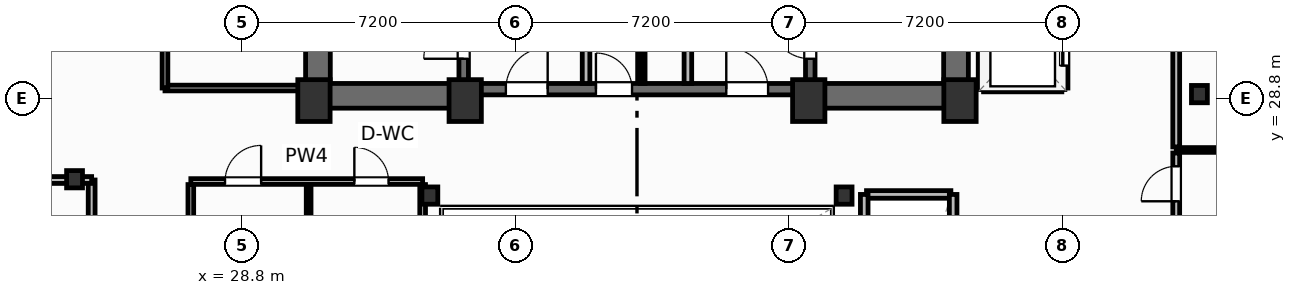
"""IFC4 building model, lengths in metres.
Left out: names, types, materials, properties, quantities, classifications, styles, units other than length and angle.
Written with IfcOpenShell. Run it as: python <this file> out.ifc"""

import sys

from ifc_helpers import new_model, si_unit, direction, frame, frame_2d, origin, origin_2d, place, context, subcontext, project, spatial, rectangle, i_section, extrude, element, fill, save


model = new_model("IFC4")
c1 = context("Model", 3, precision=1e-05, world=origin(), true_north=direction((0.0, 1.0)))
c2 = subcontext(c1, "Body", "Model", "MODEL_VIEW")
j1 = project(units=[si_unit("LENGTHUNIT", "METRE"), si_unit("PLANEANGLEUNIT", "RADIAN")], contexts=[c1])
p1 = place(None, origin())
s1 = spatial("IfcSite", under=j1, at=p1, CompositionType="ELEMENT")
p2 = place(p1, origin())
s2 = spatial("IfcBuilding", under=s1, at=p2, CompositionType="ELEMENT")
p3 = place(p2, frame((0.0, 0.0, 196.8)))
s3 = spatial("IfcBuildingStorey", under=s2, at=p3, CompositionType="ELEMENT", Elevation=196.8)
for number, where, z_axis, x_axis in (
    (1, (30.7, 28.75, 0.0), (0.0, 0.0, 1.0), (1.0, 0.0, 0.0)),
    (2, (34.68, 28.75, 0.0), (0.0, 0.0, 1.0), (1.0, 0.0, 0.0)),
    (3, (43.72, 28.75, 0.0), (0.0, 0.0, 1.0), (1.0, 0.0, 0.0)),
    (4, (47.7, 28.75, 0.0), (0.0, 0.0, 1.0), (1.0, 0.0, 0.0)),
):
    element("IfcColumn", number, at=place(p3, frame(where, z_axis=z_axis, x_axis=x_axis)), inside=s3, PredefinedType="COLUMN", context=c2, shape_type="SweptSolid", body=[
        extrude(rectangle(XDim=0.85, YDim=1.1, at=origin_2d()), origin(), (0.0, 0.0, 1.0), 3.7),
    ])
for number, where, z_axis, x_axis in (
    (5, (33.75, 26.25, 0.0), (0.0, 0.0, 1.0), (1.0, 0.0, 0.0)),
    (6, (44.65, 26.25, 0.0), (0.0, 0.0, 1.0), (1.0, 0.0, 0.0)),
    (7, (24.4, 26.68, 0.0), (0.0, 0.0, 1.0), (1.0, 0.0, 0.0)),
    (8, (54.0, 28.92, 0.0), (0.0, 0.0, 1.0), (1.0, 0.0, 0.0)),
):
    element("IfcColumn", number, at=place(p3, frame(where, z_axis=z_axis, x_axis=x_axis)), inside=s3, PredefinedType="COLUMN", context=c2, shape_type="SweptSolid", body=[
        extrude(i_section(OverallWidth=0.418, OverallDepth=0.455, WebThickness=0.042, FlangeThickness=0.068, FilletRadius=0.025, at=origin_2d()), origin(), (0.0, 0.0, 1.0), 3.7),
    ])
for number, where, z_axis, x_axis in (
    (9, (30.805, 29.2, 0.0), (0.0, 0.0, 1.0), (0.0, 1.0, 0.0)),
    (10, (47.595, 29.2, 0.0), (0.0, 0.0, 1.0), (0.0, 1.0, 0.0)),
):
    element("IfcWall", number, at=place(p3, frame(where, z_axis=z_axis, x_axis=x_axis)), inside=s3, PredefinedType="SHEAR", context=c2, shape_type="SweptSolid", body=[
        extrude(rectangle(XDim=9.22, YDim=0.65, at=frame_2d((4.61, 0.0))), origin(), (0.0, 0.0, 1.0), 3.45),
    ])
p4 = place(p3, frame((30.48, 28.875, 0.0), z_axis=(0.0, 0.0, 1.0), x_axis=(1.0, 0.0, 0.0)))
e11 = element("IfcWall", 11, at=p4, inside=s3, PredefinedType="SHEAR", context=c2, shape_type="SweptSolid", body=[
    extrude(rectangle(XDim=4.32, YDim=0.65, at=frame_2d((2.16, 0.0))), origin(), (0.0, 0.0, 1.0), 3.45),
])
p5 = place(p3, frame((43.6, 28.875, 0.0), z_axis=(0.0, 0.0, 1.0), x_axis=(1.0, 0.0, 0.0)))
e12 = element("IfcWall", 12, at=p5, inside=s3, PredefinedType="SHEAR", context=c2, shape_type="SweptSolid", body=[
    extrude(rectangle(XDim=4.32, YDim=0.65, at=frame_2d((2.16, 0.0))), origin(), (0.0, 0.0, 1.0), 3.45),
])
p6 = place(p3, frame((34.8, 29.05, 0.0), z_axis=(0.0, 0.0, 1.0), x_axis=(1.0, 0.0, 0.0)))
e13 = element("IfcWall", 13, at=p6, inside=s3, PredefinedType="SHEAR", context=c2, shape_type="SweptSolid", body=[
    extrude(rectangle(XDim=8.8, YDim=0.3, at=frame_2d((4.4, 0.0))), origin(), (0.0, 0.0, 1.0), 3.45),
])
p7 = place(p6, frame((0.95, 0.0, 0.0)))
e14 = element("IfcOpeningElement", 14, at=p7, cuts=e13, PredefinedType="OPENING", context=c2, shape_type="SweptSolid", body=[
    extrude(rectangle(XDim=1.1, YDim=2.15, at=frame_2d((0.55, 1.075))), frame((0.0, 0.16, 0.0), z_axis=(0.0, -1.0, 0.0), x_axis=(1.0, 0.0, 0.0)), (0.0, 0.0, 1.0), 0.32),
])
p8 = place(p6, frame((6.75, 0.0, 0.0)))
e15 = element("IfcOpeningElement", 15, at=p8, cuts=e13, PredefinedType="OPENING", context=c2, shape_type="SweptSolid", body=[
    extrude(rectangle(XDim=1.1, YDim=2.15, at=frame_2d((0.55, 1.075))), frame((0.0, 0.16, 0.0), z_axis=(0.0, -1.0, 0.0), x_axis=(1.0, 0.0, 0.0)), (0.0, 0.0, 1.0), 0.32),
])
p9 = place(p6, frame((3.32, 0.0, 0.0)))
e16 = element("IfcOpeningElement", 16, at=p9, cuts=e13, PredefinedType="OPENING", context=c2, shape_type="SweptSolid", body=[
    extrude(rectangle(XDim=0.95, YDim=2.15, at=frame_2d((0.475, 1.075))), frame((0.0, 0.16, 0.0), z_axis=(0.0, -1.0, 0.0), x_axis=(1.0, 0.0, 0.0)), (0.0, 0.0, 1.0), 0.32),
])
p10 = place(p3, frame((34.64, 29.2, 0.0), z_axis=(0.0, 0.0, 1.0), x_axis=(0.0, 1.0, 0.0)))
e17 = element("IfcWall", 17, at=p10, inside=s3, PredefinedType="SHEAR", context=c2, shape_type="SweptSolid", body=[
    extrude(rectangle(XDim=9.22, YDim=0.25, at=frame_2d((4.61, 0.0))), origin(), (0.0, 0.0, 1.0), 3.45),
])
p11 = place(p10, frame((0.65, 0.0, 0.0)))
e18 = element("IfcOpeningElement", 18, at=p11, cuts=e17, PredefinedType="OPENING", context=c2, shape_type="SweptSolid", body=[
    extrude(rectangle(XDim=1.05, YDim=2.15, at=frame_2d((0.525, 1.075))), frame((0.0, 0.135, 0.0), z_axis=(0.0, -1.0, 0.0), x_axis=(1.0, 0.0, 0.0)), (0.0, 0.0, 1.0), 0.27),
])
p12 = place(p3, frame((43.76, 29.2, 0.0), z_axis=(0.0, 0.0, 1.0), x_axis=(0.0, 1.0, 0.0)))
e19 = element("IfcWall", 19, at=p12, inside=s3, PredefinedType="SHEAR", context=c2, shape_type="SweptSolid", body=[
    extrude(rectangle(XDim=9.22, YDim=0.25, at=frame_2d((4.61, 0.0))), origin(), (0.0, 0.0, 1.0), 3.45),
])
p13 = place(p12, frame((0.65, 0.0, 0.0)))
e20 = element("IfcOpeningElement", 20, at=p13, cuts=e19, PredefinedType="OPENING", context=c2, shape_type="SweptSolid", body=[
    extrude(rectangle(XDim=1.05, YDim=2.15, at=frame_2d((0.525, 1.075))), frame((0.0, 0.135, 0.0), z_axis=(0.0, -1.0, 0.0), x_axis=(1.0, 0.0, 0.0)), (0.0, 0.0, 1.0), 0.27),
])
p14 = place(p3, frame((24.85, 19.24, 0.0), z_axis=(0.0, 0.0, 1.0), x_axis=(0.0, 1.0, 0.0)))
e21 = element("IfcWall", 21, at=p14, inside=s3, PredefinedType="PARTITIONING", context=c2, shape_type="SweptSolid", body=[
    extrude(rectangle(XDim=7.42, YDim=0.18, at=frame_2d((3.71, 0.0))), origin(), (0.0, 0.0, 1.0), 3.45),
])
p15 = place(p14, frame((2.4, 0.0, 0.0)))
e22 = element("IfcOpeningElement", 22, at=p15, cuts=e21, PredefinedType="OPENING", context=c2, shape_type="SweptSolid", body=[
    extrude(rectangle(XDim=0.92, YDim=2.05, at=frame_2d((0.46, 1.025))), frame((0.0, 0.1, 0.0), z_axis=(0.0, -1.0, 0.0), x_axis=(1.0, 0.0, 0.0)), (0.0, 0.0, 1.0), 0.2),
])
p16 = place(p3, frame((3.658, 26.66, 0.0), z_axis=(0.0, 0.0, 1.0), x_axis=(1.0, 0.0, 0.0)))
e23 = element("IfcWall", 23, at=p16, inside=s3, PredefinedType="PARTITIONING", context=c2, shape_type="SweptSolid", body=[
    extrude(rectangle(XDim=21.192, YDim=0.18, at=frame_2d((10.596, 0.0))), origin(), (0.0, 0.0, 1.0), 2.662),
])
p17 = place(p3, frame((53.39, 19.3, 0.0), z_axis=(0.0, 0.0, 1.0), x_axis=(0.0, 1.0, 0.0)))
e24 = element("IfcWall", 24, at=p17, inside=s3, PredefinedType="PARTITIONING", context=c2, shape_type="SweptSolid", body=[
    extrude(rectangle(XDim=8.07, YDim=0.18, at=frame_2d((4.035, 0.0))), origin(), (0.0, 0.0, 1.0), 3.45),
])
p18 = place(p17, frame((6.8, 0.0, 0.0)))
e25 = element("IfcOpeningElement", 25, at=p18, cuts=e24, PredefinedType="OPENING", context=c2, shape_type="SweptSolid", body=[
    extrude(rectangle(XDim=0.92, YDim=2.05, at=frame_2d((0.46, 1.025))), frame((0.0, 0.1, 0.0), z_axis=(0.0, -1.0, 0.0), x_axis=(1.0, 0.0, 0.0)), (0.0, 0.0, 1.0), 0.2),
])
p19 = place(p3, frame((53.39, 27.53, 0.0), z_axis=(0.0, 0.0, 1.0), x_axis=(0.0, 1.0, 0.0)))
e26 = element("IfcWall", 26, at=p19, inside=s3, PredefinedType="PARTITIONING", context=c2, shape_type="SweptSolid", body=[
    extrude(rectangle(XDim=11.67, YDim=0.18, at=frame_2d((5.835, 0.0))), origin(), (0.0, 0.0, 1.0), 3.45),
])
p20 = place(p19, frame((5.8, 0.0, 0.0)))
e27 = element("IfcOpeningElement", 27, at=p20, cuts=e26, PredefinedType="OPENING", context=c2, shape_type="SweptSolid", body=[
    extrude(rectangle(XDim=0.92, YDim=2.05, at=frame_2d((0.46, 1.025))), frame((0.0, 0.1, 0.0), z_axis=(0.0, -1.0, 0.0), x_axis=(1.0, 0.0, 0.0)), (0.0, 0.0, 1.0), 0.2),
])
p21 = place(p3, frame((53.39, 27.45, 0.0), z_axis=(0.0, 0.0, 1.0), x_axis=(1.0, 0.0, 0.0)))
e28 = element("IfcWall", 28, at=p21, inside=s3, PredefinedType="PARTITIONING", context=c2, shape_type="SweptSolid", body=[
    extrude(rectangle(XDim=20.927, YDim=0.125, at=frame_2d((10.463, 0.0))), origin(), (0.0, 0.0, 1.0), 2.662),
])
for number, where, z_axis, x_axis in (
    (29, (37.86, 29.2, 0.0), (0.0, 0.0, 1.0), (0.0, 1.0, 0.0)),
    (30, (40.54, 29.2, 0.0), (0.0, 0.0, 1.0), (0.0, 1.0, 0.0)),
):
    element("IfcWall", number, at=place(p3, frame(where, z_axis=z_axis, x_axis=x_axis)), inside=s3, PredefinedType="PARTITIONING", context=c2, shape_type="SweptSolid", body=[
        extrude(rectangle(XDim=5.18, YDim=0.2, at=frame_2d((2.59, 0.0))), origin(), (0.0, 0.0, 1.0), 3.45),
    ])
p22 = place(p3, frame((39.35, 29.2, 0.0), z_axis=(0.0, 0.0, 1.0), x_axis=(0.0, 1.0, 0.0)))
e31 = element("IfcWall", 31, at=p22, inside=s3, PredefinedType="PARTITIONING", context=c2, shape_type="SweptSolid", body=[
    extrude(rectangle(XDim=5.22, YDim=0.125, at=frame_2d((2.61, 0.0))), origin(), (0.0, 0.0, 1.0), 3.45),
])
p23 = place(p22, frame((2.05, 0.0, 0.0)))
e32 = element("IfcOpeningElement", 32, at=p23, cuts=e31, PredefinedType="OPENING", context=c2, shape_type="SweptSolid", body=[
    extrude(rectangle(XDim=0.85, YDim=2.05, at=frame_2d((0.425, 1.025))), frame((0.0, 0.073, 0.0), z_axis=(0.0, -1.0, 0.0), x_axis=(1.0, 0.0, 0.0)), (0.0, 0.0, 1.0), 0.145),
])
p24 = place(p3, frame((27.46, 26.62, 0.0), z_axis=(0.0, 0.0, 1.0), x_axis=(1.0, 0.0, 0.0)))
e33 = element("IfcWall", 33, at=p24, inside=s3, PredefinedType="PARTITIONING", context=c2, shape_type="SweptSolid", body=[
    extrude(rectangle(XDim=6.1, YDim=0.15, at=frame_2d((3.05, 0.0))), origin(), (0.0, 0.0, 1.0), 2.662),
])
p25 = place(p24, frame((0.9, 0.0, 0.0)))
e34 = element("IfcOpeningElement", 34, at=p25, cuts=e33, PredefinedType="OPENING", context=c2, shape_type="SweptSolid", body=[
    extrude(rectangle(XDim=0.95, YDim=2.05, at=frame_2d((0.475, 1.025))), frame((0.0, 0.085, 0.0), z_axis=(0.0, -1.0, 0.0), x_axis=(1.0, 0.0, 0.0)), (0.0, 0.0, 1.0), 0.17),
])
p26 = place(p24, frame((4.303, 0.0, 0.0)))
e35 = element("IfcOpeningElement", 35, at=p26, cuts=e33, PredefinedType="OPENING", context=c2, shape_type="SweptSolid", body=[
    extrude(rectangle(XDim=0.9, YDim=2.05, at=frame_2d((0.45, 1.025))), frame((0.0, 0.085, 0.0), z_axis=(0.0, -1.0, 0.0), x_axis=(1.0, 0.0, 0.0)), (0.0, 0.0, 1.0), 0.17),
])
p27 = place(p3, frame((30.56, 19.38, 0.0), z_axis=(0.0, 0.0, 1.0), x_axis=(0.0, 1.0, 0.0)))
e36 = element("IfcWall", 36, at=p27, inside=s3, PredefinedType="PARTITIONING", context=c2, shape_type="SweptSolid", body=[
    extrude(rectangle(XDim=7.16, YDim=0.125, at=frame_2d((3.58, 0.0))), origin(), (0.0, 0.0, 1.0), 3.45),
])
p28 = place(p27, frame((1.4, 0.0, 0.0)))
e37 = element("IfcOpeningElement", 37, at=p28, cuts=e36, PredefinedType="OPENING", context=c2, shape_type="SweptSolid", body=[
    extrude(rectangle(XDim=0.92, YDim=2.05, at=frame_2d((0.46, 1.025))), frame((0.0, 0.073, 0.0), z_axis=(0.0, -1.0, 0.0), x_axis=(1.0, 0.0, 0.0)), (0.0, 0.0, 1.0), 0.145),
])
p29 = place(p3, frame((27.46, 19.38, 0.0), z_axis=(0.0, 0.0, 1.0), x_axis=(0.0, 1.0, 0.0)))
e38 = element("IfcWall", 38, at=p29, inside=s3, PredefinedType="PARTITIONING", context=c2, shape_type="SweptSolid", body=[
    extrude(rectangle(XDim=7.16, YDim=0.15, at=frame_2d((3.58, 0.0))), origin(), (0.0, 0.0, 1.0), 3.45),
])
p30 = place(p3, frame((33.56, 19.38, 0.0), z_axis=(0.0, 0.0, 1.0), x_axis=(0.0, 1.0, 0.0)))
e39 = element("IfcWall", 39, at=p30, inside=s3, PredefinedType="PARTITIONING", context=c2, shape_type="SweptSolid", body=[
    extrude(rectangle(XDim=7.16, YDim=0.15, at=frame_2d((3.58, 0.0))), origin(), (0.0, 0.0, 1.0), 2.824),
])
p31 = place(p3, frame((26.78, 29.08, 0.0), z_axis=(0.0, 0.0, 1.0), x_axis=(1.0, 0.0, 0.0)))
e40 = element("IfcWall", 40, at=p31, inside=s3, PredefinedType="PARTITIONING", context=c2, shape_type="SweptSolid", body=[
    extrude(rectangle(XDim=3.7, YDim=0.15, at=frame_2d((1.85, 0.0))), origin(), (0.0, 0.0, 1.0), 3.45),
])
p32 = place(p3, frame((26.78, 29.08, 0.0), z_axis=(0.0, 0.0, 1.0), x_axis=(0.0, 1.0, 0.0)))
e41 = element("IfcWall", 41, at=p32, inside=s3, PredefinedType="PARTITIONING", context=c2, shape_type="SweptSolid", body=[
    extrude(rectangle(XDim=9.18, YDim=0.15, at=frame_2d((4.59, 0.0))), origin(), (0.0, 0.0, 1.0), 3.45),
])
p33 = place(p32, frame((2.4, 0.0, 0.0)))
e42 = element("IfcOpeningElement", 42, at=p33, cuts=e41, PredefinedType="OPENING", context=c2, shape_type="SweptSolid", body=[
    extrude(rectangle(XDim=0.95, YDim=2.05, at=frame_2d((0.475, 1.025))), frame((0.0, 0.085, 0.0), z_axis=(0.0, -1.0, 0.0), x_axis=(1.0, 0.0, 0.0)), (0.0, 0.0, 1.0), 0.17),
])
p34 = place(p3, frame((48.32, 29.08, 0.0), z_axis=(0.0, 0.0, 1.0), x_axis=(1.0, 0.0, 0.0)))
e43 = element("IfcWall", 43, at=p34, inside=s3, PredefinedType="PARTITIONING", context=c2, shape_type="SweptSolid", body=[
    extrude(rectangle(XDim=2.06, YDim=0.2, at=frame_2d((1.03, 0.0))), origin(), (0.0, 0.0, 1.0), 2.662),
])
p35 = place(p3, frame((48.28, 29.08, 0.0), z_axis=(0.0, 0.0, 1.0), x_axis=(0.0, 1.0, 0.0)))
e44 = element("IfcWall", 44, at=p35, inside=s3, PredefinedType="PARTITIONING", context=c2, shape_type="SweptSolid", body=[
    extrude(rectangle(XDim=6.89, YDim=0.2, at=frame_2d((3.445, 0.0))), origin(), (0.0, 0.0, 1.0), 3.45),
])
p36 = place(p3, frame((50.44, 29.08, 0.0), z_axis=(0.0, 0.0, 1.0), x_axis=(0.0, 1.0, 0.0)))
e45 = element("IfcWall", 45, at=p36, inside=s3, PredefinedType="PARTITIONING", context=c2, shape_type="SweptSolid", body=[
    extrude(rectangle(XDim=6.89, YDim=0.2, at=frame_2d((3.445, 0.0))), origin(), (0.0, 0.0, 1.0), 3.45),
])
p37 = place(p36, frame((0.59, 0.0, 0.0)))
e46 = element("IfcOpeningElement", 46, at=p37, cuts=e45, PredefinedType="OPENING", context=c2, shape_type="SweptSolid", body=[
    extrude(rectangle(XDim=1.1, YDim=2.15, at=frame_2d((0.55, 1.075))), frame((0.0, 0.11, 0.0), z_axis=(0.0, -1.0, 0.0), x_axis=(1.0, 0.0, 0.0)), (0.0, 0.0, 1.0), 0.22),
])
p38 = place(p36, frame((2.89, 0.0, 0.0)))
e47 = element("IfcOpeningElement", 47, at=p38, cuts=e45, PredefinedType="OPENING", context=c2, shape_type="SweptSolid", body=[
    extrude(rectangle(XDim=1.1, YDim=2.15, at=frame_2d((0.55, 1.075))), frame((0.0, 0.11, 0.0), z_axis=(0.0, -1.0, 0.0), x_axis=(1.0, 0.0, 0.0)), (0.0, 0.0, 1.0), 0.22),
])
p39 = place(p36, frame((5.19, 0.0, 0.0)))
e48 = element("IfcOpeningElement", 48, at=p39, cuts=e45, PredefinedType="OPENING", context=c2, shape_type="SweptSolid", body=[
    extrude(rectangle(XDim=1.1, YDim=2.15, at=frame_2d((0.55, 1.075))), frame((0.0, 0.11, 0.0), z_axis=(0.0, -1.0, 0.0), x_axis=(1.0, 0.0, 0.0)), (0.0, 0.0, 1.0), 0.22),
])
p40 = place(p3, frame((45.24, 26.28, 0.0), z_axis=(0.0, 0.0, 1.0), x_axis=(1.0, 0.0, 0.0)))
e49 = element("IfcWall", 49, at=p40, inside=s3, PredefinedType="PARTITIONING", context=c2, shape_type="SweptSolid", body=[
    extrude(rectangle(XDim=2.22, YDim=0.2, at=frame_2d((1.11, 0.0))), origin(), (0.0, 0.0, 1.0), 3.45),
])
for number, where, z_axis, x_axis in (
    (50, (45.18, 19.38, 0.0), (0.0, 0.0, 1.0), (0.0, 1.0, 0.0)),
    (51, (47.52, 19.38, 0.0), (0.0, 0.0, 1.0), (0.0, 1.0, 0.0)),
):
    element("IfcWall", number, at=place(p3, frame(where, z_axis=z_axis, x_axis=x_axis)), inside=s3, PredefinedType="PARTITIONING", context=c2, shape_type="SweptSolid", body=[
        extrude(rectangle(XDim=6.9, YDim=0.2, at=frame_2d((3.45, 0.0))), origin(), (0.0, 0.0, 1.0), 3.45),
    ])
p41 = place(p18, origin())
e52 = element("IfcDoor", 52, at=p41, inside=s3, OperationType="SINGLE_SWING_LEFT", PredefinedType="DOOR", context=c2, shape_type="SweptSolid", body=[
    extrude(rectangle(XDim=0.92, YDim=2.05, at=frame_2d((0.46, 1.025))), frame((0.0, 0.025, 0.0), z_axis=(0.0, -1.0, 0.0), x_axis=(1.0, 0.0, 0.0)), (0.0, 0.0, 1.0), 0.05),
])
fill(e25, e52)
p42 = place(p11, origin())
e53 = element("IfcDoor", 53, at=p42, inside=s3, OperationType="SINGLE_SWING_LEFT", PredefinedType="DOOR", context=c2, shape_type="SweptSolid", body=[
    extrude(rectangle(XDim=1.05, YDim=2.15, at=frame_2d((0.525, 1.075))), frame((0.0, 0.025, 0.0), z_axis=(0.0, -1.0, 0.0), x_axis=(1.0, 0.0, 0.0)), (0.0, 0.0, 1.0), 0.05),
])
fill(e18, e53)
p43 = place(p13, origin())
e54 = element("IfcDoor", 54, at=p43, inside=s3, OperationType="SINGLE_SWING_RIGHT", PredefinedType="DOOR", context=c2, shape_type="SweptSolid", body=[
    extrude(rectangle(XDim=1.05, YDim=2.15, at=frame_2d((0.525, 1.075))), frame((0.0, 0.025, 0.0), z_axis=(0.0, -1.0, 0.0), x_axis=(1.0, 0.0, 0.0)), (0.0, 0.0, 1.0), 0.05),
])
fill(e20, e54)
p44 = place(p7, origin())
e55 = element("IfcDoor", 55, at=p44, inside=s3, OperationType="SINGLE_SWING_RIGHT", PredefinedType="DOOR", context=c2, shape_type="SweptSolid", body=[
    extrude(rectangle(XDim=1.1, YDim=2.15, at=frame_2d((0.55, 1.075))), frame((0.0, 0.025, 0.0), z_axis=(0.0, -1.0, 0.0), x_axis=(1.0, 0.0, 0.0)), (0.0, 0.0, 1.0), 0.05),
])
fill(e14, e55)
p45 = place(p8, origin())
e56 = element("IfcDoor", 56, at=p45, inside=s3, OperationType="SINGLE_SWING_LEFT", PredefinedType="DOOR", context=c2, shape_type="SweptSolid", body=[
    extrude(rectangle(XDim=1.1, YDim=2.15, at=frame_2d((0.55, 1.075))), frame((0.0, 0.025, 0.0), z_axis=(0.0, -1.0, 0.0), x_axis=(1.0, 0.0, 0.0)), (0.0, 0.0, 1.0), 0.05),
])
fill(e15, e56)
p46 = place(p9, origin())
e57 = element("IfcDoor", 57, at=p46, inside=s3, OperationType="SINGLE_SWING_LEFT", PredefinedType="DOOR", context=c2, shape_type="SweptSolid", body=[
    extrude(rectangle(XDim=0.95, YDim=2.15, at=frame_2d((0.475, 1.075))), frame((0.0, 0.025, 0.0), z_axis=(0.0, -1.0, 0.0), x_axis=(1.0, 0.0, 0.0)), (0.0, 0.0, 1.0), 0.05),
])
fill(e16, e57)
p47 = place(p25, origin())
e58 = element("IfcDoor", 58, at=p47, inside=s3, OperationType="SINGLE_SWING_RIGHT", PredefinedType="DOOR", context=c2, shape_type="SweptSolid", body=[
    extrude(rectangle(XDim=0.95, YDim=2.05, at=frame_2d((0.475, 1.025))), frame((0.0, 0.025, 0.0), z_axis=(0.0, -1.0, 0.0), x_axis=(1.0, 0.0, 0.0)), (0.0, 0.0, 1.0), 0.05),
])
fill(e34, e58)
p48 = place(p26, origin())
e59 = element("IfcDoor", 59, at=p48, inside=s3, OperationType="SINGLE_SWING_LEFT", PredefinedType="DOOR", context=c2, shape_type="SweptSolid", body=[
    extrude(rectangle(XDim=0.9, YDim=2.05, at=frame_2d((0.45, 1.025))), frame((0.0, 0.025, 0.0), z_axis=(0.0, -1.0, 0.0), x_axis=(1.0, 0.0, 0.0)), (0.0, 0.0, 1.0), 0.05),
])
fill(e35, e59)
p49 = place(p37, origin())
e60 = element("IfcDoor", 60, at=p49, inside=s3, OperationType="SLIDING_TO_LEFT", PredefinedType="DOOR", context=c2, shape_type="SweptSolid", body=[
    extrude(rectangle(XDim=1.1, YDim=2.15, at=frame_2d((0.55, 1.075))), frame((0.0, 0.025, 0.0), z_axis=(0.0, -1.0, 0.0), x_axis=(1.0, 0.0, 0.0)), (0.0, 0.0, 1.0), 0.05),
])
fill(e46, e60)
save(model, sys.argv[1])
